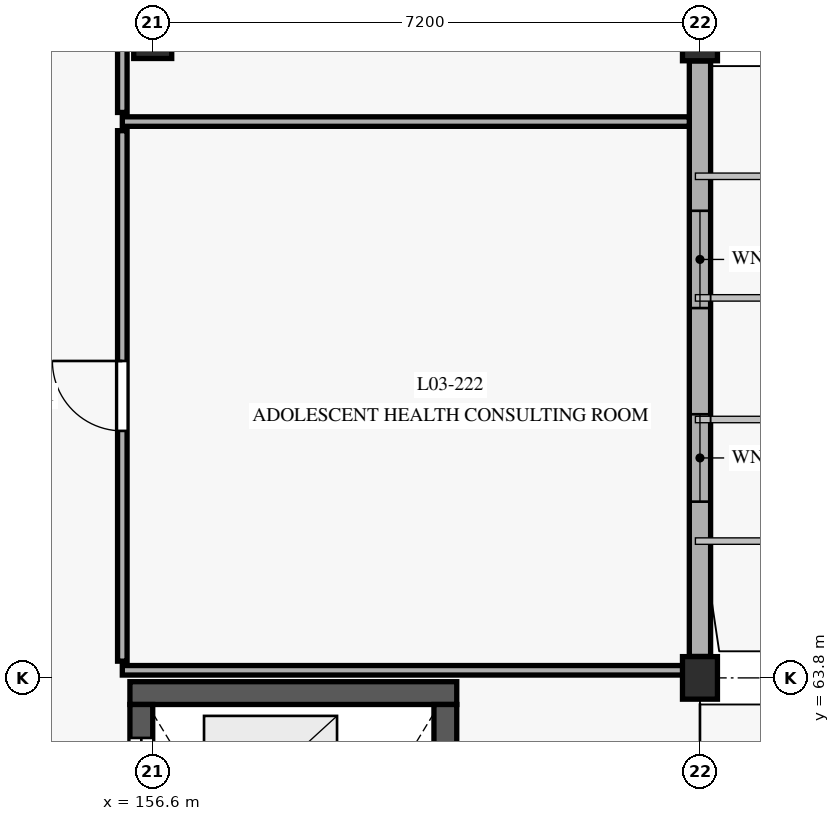
"""IFC4 building model, lengths in metres.
Left out: names, types, materials, properties, quantities, classifications, styles, units other than length and angle.
Written with IfcOpenShell. Run it as: python <this file> out.ifc"""

import sys

from ifc_helpers import new_model, si_unit, direction, frame, frame_2d, origin, origin_with_axes, origin_2d, place, context, subcontext, project, spatial, rectangle, extrude, element, fill, save


model = new_model("IFC4")
c1 = context("Model", 3, precision=1e-05, world=origin(), true_north=direction((0.0, 1.0)))
c2 = subcontext(c1, "Body", "Model", "MODEL_VIEW")
j1 = project(units=[si_unit("LENGTHUNIT", "METRE"), si_unit("PLANEANGLEUNIT", "RADIAN")], contexts=[c1])
p1 = place(None, origin())
s1 = spatial("IfcSite", under=j1, at=p1, CompositionType="ELEMENT")
p2 = place(p1, origin())
s2 = spatial("IfcBuilding", under=s1, at=p2, CompositionType="ELEMENT")
p3 = place(p2, frame((0.0, 0.0, 9.3)))
s3 = spatial("IfcBuildingStorey", under=s2, at=p3, CompositionType="ELEMENT", Elevation=9.3)
p4 = place(p3, frame((156.6, 72.2, 0.0), z_axis=(0.0, 0.0, 1.0), x_axis=(1.0, 0.0, 0.0)))
e1 = element("IfcColumn", 1, at=p4, inside=s3, PredefinedType="COLUMN", context=c2, shape_type="SweptSolid", body=[
    extrude(rectangle(XDim=0.5, YDim=0.5, at=origin_2d()), origin(), (0.0, 0.0, 1.0), 4.2),
])
for number, where, z_axis, x_axis in (
    (2, (163.8, 63.8, 0.0), (0.0, 0.0, 1.0), (1.0, 0.0, 0.0)),
    (3, (163.8, 72.2, 0.0), (0.0, 0.0, 1.0), (1.0, 0.0, 0.0)),
):
    element("IfcColumn", number, at=place(p3, frame(where, z_axis=z_axis, x_axis=x_axis)), inside=s3, PredefinedType="COLUMN", context=c2, shape_type="SweptSolid", body=[
        extrude(rectangle(XDim=0.46, YDim=0.56, at=origin_2d()), origin(), (0.0, 0.0, 1.0), 4.2),
    ])
p5 = place(p3, frame((160.6, 63.6, 0.0), z_axis=(0.0, 0.0, 1.0), x_axis=(-1.0, 0.0, 0.0)))
e4 = element("IfcWall", 4, at=p5, inside=s3, PredefinedType="SHEAR", context=c2, shape_type="SweptSolid", body=[
    extrude(rectangle(XDim=4.3, YDim=0.3, at=frame_2d((2.15, 0.0))), origin(), (0.0, 0.0, 1.0), 3.9),
])
p6 = place(p3, frame((156.45, 63.45, 0.0), z_axis=(0.0, 0.0, 1.0), x_axis=(0.0, -1.0, 0.0)))
e5 = element("IfcWall", 5, at=p6, inside=s3, PredefinedType="SHEAR", context=c2, shape_type="SweptSolid", body=[
    extrude(rectangle(XDim=13.5, YDim=0.3, at=frame_2d((6.75, 0.0))), origin(), (0.0, 0.0, 1.0), 3.9),
])
p7 = place(p6, frame((12.2, 0.0, 0.0)))
e6 = element("IfcOpeningElement", 6, at=p7, cuts=e5, PredefinedType="OPENING", context=c2, shape_type="SweptSolid", body=[
    extrude(rectangle(XDim=1.1, YDim=2.2, at=frame_2d((0.55, 1.1))), frame((0.0, 0.16, 0.0), z_axis=(0.0, -1.0, 0.0), x_axis=(1.0, 0.0, 0.0)), (0.0, 0.0, 1.0), 0.32),
])
p8 = place(p6, frame((4.475, 0.0, 0.0)))
e7 = element("IfcOpeningElement", 7, at=p8, cuts=e5, PredefinedType="OPENING", context=c2, shape_type="SweptSolid", body=[
    extrude(rectangle(XDim=1.15, YDim=2.2, at=frame_2d((0.575, 1.1))), frame((0.0, 0.16, 0.0), z_axis=(0.0, -1.0, 0.0), x_axis=(1.0, 0.0, 0.0)), (0.0, 0.0, 1.0), 0.32),
])
p9 = place(p6, frame((2.34, 0.0, 0.0)))
e8 = element("IfcOpeningElement", 8, at=p9, cuts=e5, PredefinedType="OPENING", context=c2, shape_type="SweptSolid", body=[
    extrude(rectangle(XDim=1.02, YDim=2.15, at=frame_2d((0.51, 1.075))), frame((0.0, 0.16, 0.0), z_axis=(0.0, -1.0, 0.0), x_axis=(1.0, 0.0, 0.0)), (0.0, 0.0, 1.0), 0.32),
])
p10 = place(p6, frame((0.44, 0.0, 0.0)))
e9 = element("IfcOpeningElement", 9, at=p10, cuts=e5, PredefinedType="OPENING", context=c2, shape_type="SweptSolid", body=[
    extrude(rectangle(XDim=1.02, YDim=2.15, at=frame_2d((0.51, 1.075))), frame((0.0, 0.16, 0.0), z_axis=(0.0, -1.0, 0.0), x_axis=(1.0, 0.0, 0.0)), (0.0, 0.0, 1.0), 0.32),
])
p11 = place(p3, frame((160.45, 49.95, 0.0), z_axis=(0.0, 0.0, 1.0), x_axis=(0.0, 1.0, 0.0)))
e10 = element("IfcWall", 10, at=p11, inside=s3, PredefinedType="SHEAR", context=c2, shape_type="SweptSolid", body=[
    extrude(rectangle(XDim=13.5, YDim=0.3, at=frame_2d((6.75, 0.0))), origin(), (0.0, 0.0, 1.0), 3.9),
])
p12 = place(p3, frame((163.8, 64.082, 0.0), z_axis=(0.0, 0.0, 1.0), x_axis=(0.0, 1.0, 0.0)))
e11 = element("IfcWall", 11, at=p12, inside=s3, PredefinedType="SOLIDWALL", context=c2, shape_type="SweptSolid", body=[
    extrude(rectangle(XDim=7.836, YDim=0.28, at=frame_2d((3.918, 0.0))), origin(), (0.0, 0.0, 1.0), 3.48),
])
p13 = place(p12, frame((2.037, 0.0, 0.88)))
e12 = element("IfcOpeningElement", 12, at=p13, cuts=e11, PredefinedType="OPENING", context=c2, shape_type="SweptSolid", body=[
    extrude(rectangle(XDim=1.15, YDim=1.65, at=frame_2d((0.575, 0.825))), frame((0.0, 0.15, 0.0), z_axis=(0.0, -1.0, 0.0), x_axis=(1.0, 0.0, 0.0)), (0.0, 0.0, 1.0), 0.3),
])
p14 = place(p12, frame((4.584, 0.0, 0.88)))
e13 = element("IfcOpeningElement", 13, at=p14, cuts=e11, PredefinedType="OPENING", context=c2, shape_type="SweptSolid", body=[
    extrude(rectangle(XDim=1.28, YDim=1.95, at=frame_2d((0.64, 0.975))), frame((0.0, 0.15, 0.0), z_axis=(0.0, -1.0, 0.0), x_axis=(1.0, 0.0, 0.0)), (0.0, 0.0, 1.0), 0.3),
])
p15 = place(p3, frame((156.2, 64.02, 0.0), z_axis=(0.0, 0.0, 1.0), x_axis=(0.0, 1.0, 0.0)))
e14 = element("IfcWall", 14, at=p15, inside=s3, PredefinedType="PARTITIONING", context=c2, shape_type="SweptSolid", body=[
    extrude(rectangle(XDim=6.98, YDim=0.125, at=frame_2d((3.49, 0.0))), origin(), (0.0, 0.0, 1.0), 3.495),
])
p16 = place(p15, frame((3.03, 0.0, 0.0)))
e15 = element("IfcOpeningElement", 15, at=p16, cuts=e14, PredefinedType="OPENING", context=c2, shape_type="SweptSolid", body=[
    extrude(rectangle(XDim=0.92, YDim=2.15, at=frame_2d((0.46, 1.075))), frame((0.0, 0.073, 0.0), z_axis=(0.0, -1.0, 0.0), x_axis=(1.0, 0.0, 0.0)), (0.0, 0.0, 1.0), 0.145),
])
p17 = place(p3, frame((156.2, 63.9, 0.0), z_axis=(0.0, 0.0, 1.0), x_axis=(1.0, 0.0, 0.0)))
e16 = element("IfcWall", 16, at=p17, inside=s3, PredefinedType="PARTITIONING", context=c2, shape_type="SweptSolid", body=[
    extrude(rectangle(XDim=7.46, YDim=0.125, at=frame_2d((3.73, 0.0))), origin(), (0.0, 0.0, 1.0), 3.495),
])
p18 = place(p3, frame((156.2, 71.12, 0.0), z_axis=(0.0, 0.0, 1.0), x_axis=(1.0, 0.0, 0.0)))
e17 = element("IfcWall", 17, at=p18, inside=s3, PredefinedType="PARTITIONING", context=c2, shape_type="SweptSolid", body=[
    extrude(rectangle(XDim=7.46, YDim=0.125, at=frame_2d((3.73, 0.0))), origin(), (0.0, 0.0, 1.0), 3.475),
])
p19 = place(p3, frame((156.2, 71.24, 0.0), z_axis=(0.0, 0.0, 1.0), x_axis=(0.0, 1.0, 0.0)))
e18 = element("IfcWall", 18, at=p19, inside=s3, PredefinedType="PARTITIONING", context=c2, shape_type="SweptSolid", body=[
    extrude(rectangle(XDim=5.58, YDim=0.125, at=frame_2d((2.79, 0.0))), origin(), (0.0, 0.0, 1.0), 3.895),
])
p20 = place(p19, frame((2.23, 0.0, 0.0)))
e19 = element("IfcOpeningElement", 19, at=p20, cuts=e18, PredefinedType="OPENING", context=c2, shape_type="SweptSolid", body=[
    extrude(rectangle(XDim=1.12, YDim=2.2, at=frame_2d((0.56, 1.1))), frame((0.0, 0.073, 0.0), z_axis=(0.0, -1.0, 0.0), x_axis=(1.0, 0.0, 0.0)), (0.0, 0.0, 1.0), 0.145),
])
p21 = place(p10, origin_with_axes())
e20 = element("IfcDoor", 20, at=p21, inside=s3, OperationType="SLIDING_TO_LEFT", PredefinedType="DOOR", context=c2, shape_type="SweptSolid", body=[
    extrude(rectangle(XDim=1.02, YDim=2.15, at=frame_2d((0.51, 1.075))), frame((0.0, 0.025, 0.0), z_axis=(0.0, -1.0, 0.0), x_axis=(1.0, 0.0, 0.0)), (0.0, 0.0, 1.0), 0.05),
])
fill(e9, e20)
p22 = place(p13, origin_with_axes())
e21 = element("IfcWindow", 21, at=p22, inside=s3, PartitioningType="SINGLE_PANEL", PredefinedType="WINDOW", context=c2, shape_type="SweptSolid", body=[
    extrude(rectangle(XDim=1.15, YDim=1.65, at=frame_2d((0.575, 0.825))), frame((0.0, 0.03, 0.0), z_axis=(0.0, -1.0, 0.0), x_axis=(1.0, 0.0, 0.0)), (0.0, 0.0, 1.0), 0.06),
])
fill(e12, e21)
p23 = place(p14, origin_with_axes())
e22 = element("IfcWindow", 22, at=p23, inside=s3, PartitioningType="SINGLE_PANEL", PredefinedType="WINDOW", context=c2, shape_type="SweptSolid", body=[
    extrude(rectangle(XDim=1.28, YDim=1.95, at=frame_2d((0.64, 0.975))), frame((0.0, 0.03, 0.0), z_axis=(0.0, -1.0, 0.0), x_axis=(1.0, 0.0, 0.0)), (0.0, 0.0, 1.0), 0.06),
])
fill(e13, e22)
p24 = place(p16, frame((0.92, 0.0, 0.0), z_axis=(0.0, 0.0, 1.0), x_axis=(-1.0, 0.0, 0.0)))
e23 = element("IfcDoor", 23, at=p24, inside=s3, OperationType="SINGLE_SWING_LEFT", PredefinedType="DOOR", context=c2, shape_type="SweptSolid", body=[
    extrude(rectangle(XDim=0.92, YDim=2.15, at=frame_2d((0.46, 1.075))), frame((0.0, 0.025, 0.0), z_axis=(0.0, -1.0, 0.0), x_axis=(1.0, 0.0, 0.0)), (0.0, 0.0, 1.0), 0.05),
])
fill(e15, e23)
save(model, sys.argv[1])
